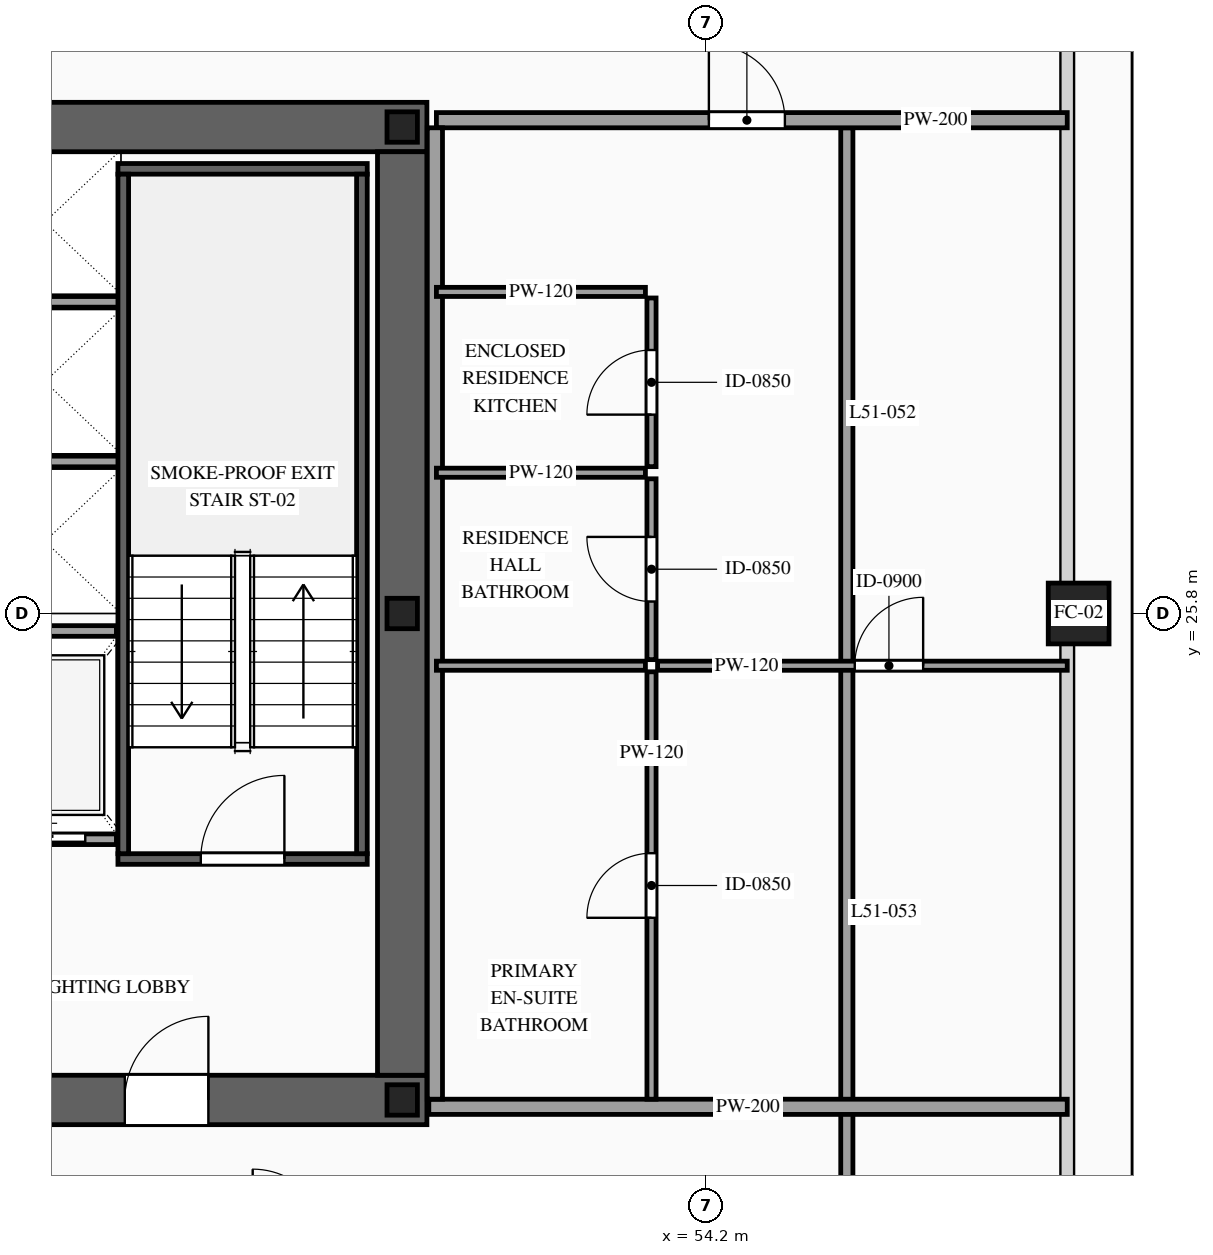
"""IFC4 building model, lengths in metres.
Left out: names, types, materials, properties, quantities, classifications, styles, units other than length and angle.
Written with IfcOpenShell. Run it as: python <this file> out.ifc"""

import sys

from ifc_helpers import new_model, si_unit, direction, frame, frame_2d, origin, origin_2d, place, context, subcontext, project, spatial, rectangle, hollow_rectangle, i_section, extrude, source, transform, mapped, element, fill, save


model = new_model("IFC4")
c1 = context("Model", 3, precision=1e-05, world=origin(), true_north=direction((0.0, 1.0)))
c2 = subcontext(c1, "Body", "Model", "MODEL_VIEW")
j1 = project(units=[si_unit("LENGTHUNIT", "METRE"), si_unit("PLANEANGLEUNIT", "RADIAN")], contexts=[c1])
p1 = place(None, origin())
s1 = spatial("IfcSite", under=j1, at=p1, CompositionType="ELEMENT")
p2 = place(p1, origin())
s2 = spatial("IfcBuilding", under=s1, at=p2, CompositionType="ELEMENT")
p3 = place(p2, frame((0.0, 0.0, 195.0)))
s3 = spatial("IfcBuildingStorey", under=s2, at=p3, CompositionType="ELEMENT", Elevation=195.0)
p4 = place(p3, frame((23.475, 19.4, 0.0), z_axis=(0.0, 0.0, 1.0), x_axis=(1.0, 0.0, 0.0)))
e1 = element("IfcWall", 1, at=p4, inside=s3, PredefinedType="SHEAR", context=c2, shape_type="SweptSolid", body=[
    extrude(rectangle(XDim=27.05, YDim=0.65, at=frame_2d((13.525, 0.0))), origin(), (0.0, 0.0, 1.0), 3.5),
])
p5 = place(p4, frame((1.975, 0.0, 0.0)))
e2 = element("IfcOpeningElement", 2, at=p5, cuts=e1, PredefinedType="OPENING", context=c2, shape_type="SweptSolid", body=[
    extrude(rectangle(XDim=1.1, YDim=2.2, at=frame_2d((0.55, 1.1))), frame((0.0, 0.34, 0.0), z_axis=(0.0, -1.0, 0.0), x_axis=(1.0, 0.0, 0.0)), (0.0, 0.0, 1.0), 0.68),
])
p6 = place(p4, frame((9.875, 0.0, 0.0)))
e3 = element("IfcOpeningElement", 3, at=p6, cuts=e1, PredefinedType="OPENING", context=c2, shape_type="SweptSolid", body=[
    extrude(rectangle(XDim=1.1, YDim=2.2, at=frame_2d((0.55, 1.1))), frame((0.0, 0.34, 0.0), z_axis=(0.0, -1.0, 0.0), x_axis=(1.0, 0.0, 0.0)), (0.0, 0.0, 1.0), 0.68),
])
p7 = place(p4, frame((23.075, 0.0, 0.0)))
e4 = element("IfcOpeningElement", 4, at=p7, cuts=e1, PredefinedType="OPENING", context=c2, shape_type="SweptSolid", body=[
    extrude(rectangle(XDim=1.1, YDim=2.2, at=frame_2d((0.55, 1.1))), frame((0.0, 0.34, 0.0), z_axis=(0.0, -1.0, 0.0), x_axis=(1.0, 0.0, 0.0)), (0.0, 0.0, 1.0), 0.68),
])
p8 = place(p4, frame((19.695, 0.0, 0.0)))
e5 = element("IfcOpeningElement", 5, at=p8, cuts=e1, PredefinedType="OPENING", context=c2, shape_type="SweptSolid", body=[
    extrude(rectangle(XDim=0.9, YDim=2.15, at=frame_2d((0.45, 1.075))), frame((0.0, 0.34, 0.0), z_axis=(0.0, -1.0, 0.0), x_axis=(1.0, 0.0, 0.0)), (0.0, 0.0, 1.0), 0.68),
])
p9 = place(p4, frame((18.255, 0.0, 0.0)))
e6 = element("IfcOpeningElement", 6, at=p9, cuts=e1, PredefinedType="OPENING", context=c2, shape_type="SweptSolid", body=[
    extrude(rectangle(XDim=0.9, YDim=2.15, at=frame_2d((0.45, 1.075))), frame((0.0, 0.34, 0.0), z_axis=(0.0, -1.0, 0.0), x_axis=(1.0, 0.0, 0.0)), (0.0, 0.0, 1.0), 0.68),
])
p10 = place(p3, frame((23.475, 32.2, 0.0), z_axis=(0.0, 0.0, 1.0), x_axis=(1.0, 0.0, 0.0)))
e7 = element("IfcWall", 7, at=p10, inside=s3, PredefinedType="SHEAR", context=c2, shape_type="SweptSolid", body=[
    extrude(rectangle(XDim=27.05, YDim=0.65, at=frame_2d((13.525, 0.0))), origin(), (0.0, 0.0, 1.0), 3.5),
])
p11 = place(p10, frame((4.595, 0.0, 0.0)))
e8 = element("IfcOpeningElement", 8, at=p11, cuts=e7, PredefinedType="OPENING", context=c2, shape_type="SweptSolid", body=[
    extrude(rectangle(XDim=0.9, YDim=2.15, at=frame_2d((0.45, 1.075))), frame((0.0, 0.34, 0.0), z_axis=(0.0, -1.0, 0.0), x_axis=(1.0, 0.0, 0.0)), (0.0, 0.0, 1.0), 0.68),
])
p12 = place(p10, frame((9.875, 0.0, 0.0)))
e9 = element("IfcOpeningElement", 9, at=p12, cuts=e7, PredefinedType="OPENING", context=c2, shape_type="SweptSolid", body=[
    extrude(rectangle(XDim=1.1, YDim=2.2, at=frame_2d((0.55, 1.1))), frame((0.0, 0.34, 0.0), z_axis=(0.0, -1.0, 0.0), x_axis=(1.0, 0.0, 0.0)), (0.0, 0.0, 1.0), 0.68),
])
p13 = place(p10, frame((15.725, 0.0, 0.0)))
e10 = element("IfcOpeningElement", 10, at=p13, cuts=e7, PredefinedType="OPENING", context=c2, shape_type="SweptSolid", body=[
    extrude(rectangle(XDim=1.1, YDim=2.2, at=frame_2d((0.55, 1.1))), frame((0.0, 0.34, 0.0), z_axis=(0.0, -1.0, 0.0), x_axis=(1.0, 0.0, 0.0)), (0.0, 0.0, 1.0), 0.68),
])
p14 = place(p10, frame((18.255, 0.0, 0.0)))
e11 = element("IfcOpeningElement", 11, at=p14, cuts=e7, PredefinedType="OPENING", context=c2, shape_type="SweptSolid", body=[
    extrude(rectangle(XDim=0.9, YDim=2.15, at=frame_2d((0.45, 1.075))), frame((0.0, 0.34, 0.0), z_axis=(0.0, -1.0, 0.0), x_axis=(1.0, 0.0, 0.0)), (0.0, 0.0, 1.0), 0.68),
])
p15 = place(p10, frame((19.695, 0.0, 0.0)))
e12 = element("IfcOpeningElement", 12, at=p15, cuts=e7, PredefinedType="OPENING", context=c2, shape_type="SweptSolid", body=[
    extrude(rectangle(XDim=0.9, YDim=2.15, at=frame_2d((0.45, 1.075))), frame((0.0, 0.34, 0.0), z_axis=(0.0, -1.0, 0.0), x_axis=(1.0, 0.0, 0.0)), (0.0, 0.0, 1.0), 0.68),
])
m1 = source(origin(), c2, "Body", "SweptSolid", [
    extrude(rectangle(XDim=12.15, YDim=0.65, at=frame_2d((6.075, 0.0))), origin(), (0.0, 0.0, 1.0), 3.5),
])
p16 = place(p3, frame((50.2, 19.725, 0.0), z_axis=(0.0, 0.0, 1.0), x_axis=(0.0, 1.0, 0.0)))
e13 = element("IfcWall", 13, at=p16, inside=s3, PredefinedType="SHEAR", context=c2, shape_type="MappedRepresentation", body=[
    mapped(m1, transform((0.0, 0.0, 0.0), scale=1.0)),
])
m2 = source(origin(), c2, "Body", "SweptSolid", [
    extrude(i_section(OverallWidth=0.4, OverallDepth=0.4, WebThickness=0.013, FlangeThickness=0.021, at=origin_2d()), origin(), (0.0, 0.0, 1.0), 3.5),
])
for number, where, z_axis, x_axis in (
    (14, (50.2, 19.4, 0.0), (0.0, 0.0, 1.0), (1.0, 0.0, 0.0)),
    (15, (50.2, 25.8, 0.0), (0.0, 0.0, 1.0), (1.0, 0.0, 0.0)),
    (16, (50.2, 32.2, 0.0), (0.0, 0.0, 1.0), (1.0, 0.0, 0.0)),
):
    element("IfcColumn", number, at=place(p3, frame(where, z_axis=z_axis, x_axis=x_axis)), inside=s3, PredefinedType="COLUMN", context=c2, shape_type="MappedRepresentation", body=[
        mapped(m2, transform((0.0, 0.0, 0.0), scale=1.0)),
    ])
m3 = source(origin(), c2, "Body", "SweptSolid", [
    extrude(hollow_rectangle(XDim=0.8, YDim=0.8, WallThickness=0.036, at=origin_2d()), origin(), (0.0, 0.0, 1.0), 3.5),
])
p17 = place(p3, frame((59.1, 25.8, 0.0), z_axis=(0.0, 0.0, 1.0), x_axis=(1.0, 0.0, 0.0)))
e17 = element("IfcColumn", 17, at=p17, inside=s3, PredefinedType="COLUMN", context=c2, shape_type="MappedRepresentation", body=[
    mapped(m3, transform((0.0, 0.0, 0.0), scale=1.0)),
])
p18 = place(p3, frame((44.52, 22.83, 0.0), z_axis=(0.0, 0.0, 1.0), x_axis=(1.0, 0.0, 0.0)))
e18 = element("IfcWall", 18, at=p18, inside=s3, PredefinedType="SOLIDWALL", context=c2, shape_type="SweptSolid", body=[
    extrude(rectangle(XDim=1.92, YDim=0.14, at=frame_2d((0.96, 0.0))), origin(), (0.0, 0.0, 1.0), 3.28),
])
p19 = place(p18, frame((0.41, 0.0, 0.0)))
e19 = element("IfcOpeningElement", 19, at=p19, cuts=e18, PredefinedType="OPENING", context=c2, shape_type="SweptSolid", body=[
    extrude(rectangle(XDim=1.1, YDim=2.2, at=frame_2d((0.55, 1.1))), frame((0.0, 0.085, 0.0), z_axis=(0.0, -1.0, 0.0), x_axis=(1.0, 0.0, 0.0)), (0.0, 0.0, 1.0), 0.17),
])
m4 = source(origin(), c2, "Body", "SweptSolid", [
    extrude(rectangle(XDim=1.92, YDim=0.14, at=frame_2d((0.96, 0.0))), origin(), (0.0, 0.0, 1.0), 3.28),
])
p20 = place(p3, frame((44.52, 25.57, 0.0), z_axis=(0.0, 0.0, 1.0), x_axis=(1.0, 0.0, 0.0)))
e20 = element("IfcWall", 20, at=p20, inside=s3, PredefinedType="SOLIDWALL", context=c2, shape_type="MappedRepresentation", body=[
    mapped(m4, transform((0.0, 0.0, 0.0), scale=1.0)),
])
m5 = source(origin(), c2, "Body", "SweptSolid", [
    extrude(rectangle(XDim=2.0, YDim=0.14, at=frame_2d((1.0, 0.0))), origin(), (0.0, 0.0, 1.0), 3.28),
])
for number, where, z_axis, x_axis in (
    (21, (44.5, 27.8, 0.0), (0.0, 0.0, 1.0), (1.0, 0.0, 0.0)),
    (22, (44.5, 29.9, 0.0), (0.0, 0.0, 1.0), (1.0, 0.0, 0.0)),
):
    element("IfcWall", number, at=place(p3, frame(where, z_axis=z_axis, x_axis=x_axis)), inside=s3, PredefinedType="SOLIDWALL", context=c2, shape_type="MappedRepresentation", body=[
        mapped(m5, transform((0.0, 0.0, 0.0), scale=1.0)),
    ])
p21 = place(p3, frame((46.46, 22.57, 0.0), z_axis=(0.0, 0.0, 1.0), x_axis=(1.0, 0.0, 0.0)))
e23 = element("IfcWall", 23, at=p21, inside=s3, PredefinedType="SOLIDWALL", context=c2, shape_type="SweptSolid", body=[
    extrude(rectangle(XDim=3.28, YDim=0.14, at=frame_2d((1.64, 0.0))), origin(), (0.0, 0.0, 1.0), 3.28),
])
p22 = place(p21, frame((1.09, 0.0, 0.0)))
e24 = element("IfcOpeningElement", 24, at=p22, cuts=e23, PredefinedType="OPENING", context=c2, shape_type="SweptSolid", body=[
    extrude(rectangle(XDim=1.1, YDim=2.2, at=frame_2d((0.55, 1.1))), frame((0.0, 0.085, 0.0), z_axis=(0.0, -1.0, 0.0), x_axis=(1.0, 0.0, 0.0)), (0.0, 0.0, 1.0), 0.17),
])
m6 = source(origin(), c2, "Body", "SweptSolid", [
    extrude(rectangle(XDim=3.28, YDim=0.14, at=frame_2d((1.64, 0.0))), origin(), (0.0, 0.0, 1.0), 3.28),
])
p23 = place(p3, frame((46.46, 31.65, 0.0), z_axis=(0.0, 0.0, 1.0), x_axis=(1.0, 0.0, 0.0)))
e25 = element("IfcWall", 25, at=p23, inside=s3, PredefinedType="SOLIDWALL", context=c2, shape_type="MappedRepresentation", body=[
    mapped(m6, transform((0.0, 0.0, 0.0), scale=1.0)),
])
m7 = source(origin(), c2, "Body", "SweptSolid", [
    extrude(rectangle(XDim=8.94, YDim=0.14, at=frame_2d((4.47, 0.0))), origin(), (0.0, 0.0, 1.0), 3.28),
])
for number, where, z_axis, x_axis in (
    (26, (46.53, 22.64, 0.0), (0.0, 0.0, 1.0), (0.0, 1.0, 0.0)),
    (27, (49.67, 22.64, 0.0), (0.0, 0.0, 1.0), (0.0, 1.0, 0.0)),
):
    element("IfcWall", number, at=place(p3, frame(where, z_axis=z_axis, x_axis=x_axis)), inside=s3, PredefinedType="SOLIDWALL", context=c2, shape_type="MappedRepresentation", body=[
        mapped(m7, transform((0.0, 0.0, 0.0), scale=1.0)),
    ])
m8 = source(origin(), c2, "Body", "SweptSolid", [
    extrude(rectangle(XDim=28.19, YDim=0.16, at=frame_2d((14.095, 0.0))), origin(), (0.0, 0.0, 1.0), 3.28),
])
p24 = place(p3, frame((56.05, 4.0, 0.0), z_axis=(0.0, 0.0, 1.0), x_axis=(0.0, 1.0, 0.0)))
e28 = element("IfcWall", 28, at=p24, inside=s3, PredefinedType="PARTITIONING", context=c2, shape_type="MappedRepresentation", body=[
    mapped(m8, transform((0.0, 0.0, 0.0), scale=1.0)),
])
p25 = place(p3, frame((50.65, 32.29, 0.0), z_axis=(0.0, 0.0, 1.0), x_axis=(1.0, 0.0, 0.0)))
e29 = element("IfcWall", 29, at=p25, inside=s3, PredefinedType="PARTITIONING", context=c2, shape_type="SweptSolid", body=[
    extrude(rectangle(XDim=8.3, YDim=0.2, at=frame_2d((4.15, 0.0))), origin(), (0.0, 0.0, 1.0), 2.775),
])
p26 = place(p25, frame((3.585, 0.0, 0.0)))
e30 = element("IfcOpeningElement", 30, at=p26, cuts=e29, PredefinedType="OPENING", context=c2, shape_type="SweptSolid", body=[
    extrude(rectangle(XDim=1.0, YDim=2.2, at=frame_2d((0.5, 1.1))), frame((0.0, 0.115, 0.0), z_axis=(0.0, -1.0, 0.0), x_axis=(1.0, 0.0, 0.0)), (0.0, 0.0, 1.0), 0.23),
])
m9 = source(origin(), c2, "Body", "SweptSolid", [
    extrude(rectangle(XDim=8.4, YDim=0.2, at=frame_2d((4.2, 0.0))), origin(), (0.0, 0.0, 1.0), 2.775),
])
p27 = place(p3, frame((50.55, 19.31, 0.0), z_axis=(0.0, 0.0, 1.0), x_axis=(1.0, 0.0, 0.0)))
e31 = element("IfcWall", 31, at=p27, inside=s3, PredefinedType="PARTITIONING", context=c2, shape_type="MappedRepresentation", body=[
    mapped(m9, transform((0.0, 0.0, 0.0), scale=1.0)),
])
m10 = source(origin(), c2, "Body", "SweptSolid", [
    extrude(rectangle(XDim=12.78, YDim=0.2, at=frame_2d((6.39, 0.0))), origin(), (0.0, 0.0, 1.0), 3.28),
])
p28 = place(p3, frame((50.63, 19.41, 0.0), z_axis=(0.0, 0.0, 1.0), x_axis=(0.0, 1.0, 0.0)))
e32 = element("IfcWall", 32, at=p28, inside=s3, PredefinedType="PARTITIONING", context=c2, shape_type="MappedRepresentation", body=[
    mapped(m10, transform((0.0, 0.0, 0.0), scale=1.0)),
])
m11 = source(origin(), c2, "Body", "SweptSolid", [
    extrude(rectangle(XDim=2.75, YDim=0.12, at=frame_2d((1.375, 0.0))), origin(), (0.0, 0.0, 1.0), 3.28),
])
for number, where, z_axis, x_axis in (
    (33, (50.65, 25.113, 0.0), (0.0, 0.0, 1.0), (1.0, 0.0, 0.0)),
    (34, (50.65, 27.652, 0.0), (0.0, 0.0, 1.0), (1.0, 0.0, 0.0)),
):
    element("IfcWall", number, at=place(p3, frame(where, z_axis=z_axis, x_axis=x_axis)), inside=s3, PredefinedType="PARTITIONING", context=c2, shape_type="MappedRepresentation", body=[
        mapped(m11, transform((0.0, 0.0, 0.0), scale=1.0)),
    ])
p29 = place(p3, frame((53.48, 25.193, 0.0), z_axis=(0.0, 0.0, 1.0), x_axis=(0.0, 1.0, 0.0)))
e35 = element("IfcWall", 35, at=p29, inside=s3, PredefinedType="PARTITIONING", context=c2, shape_type="SweptSolid", body=[
    extrude(rectangle(XDim=2.379, YDim=0.12, at=frame_2d((1.189, 0.0))), origin(), (0.0, 0.0, 1.0), 3.28),
])
p30 = place(p29, frame((0.764, 0.0, 0.0)))
e36 = element("IfcOpeningElement", 36, at=p30, cuts=e35, PredefinedType="OPENING", context=c2, shape_type="SweptSolid", body=[
    extrude(rectangle(XDim=0.85, YDim=2.1, at=frame_2d((0.425, 1.05))), frame((0.0, 0.075, 0.0), z_axis=(0.0, -1.0, 0.0), x_axis=(1.0, 0.0, 0.0)), (0.0, 0.0, 1.0), 0.15),
])
p31 = place(p3, frame((50.65, 30.031, 0.0), z_axis=(0.0, 0.0, 1.0), x_axis=(1.0, 0.0, 0.0)))
e37 = element("IfcWall", 37, at=p31, inside=s3, PredefinedType="PARTITIONING", context=c2, shape_type="MappedRepresentation", body=[
    mapped(m11, transform((0.0, 0.0, 0.0), scale=1.0)),
])
p32 = place(p3, frame((53.48, 27.732, 0.0), z_axis=(0.0, 0.0, 1.0), x_axis=(0.0, 1.0, 0.0)))
e38 = element("IfcWall", 38, at=p32, inside=s3, PredefinedType="PARTITIONING", context=c2, shape_type="SweptSolid", body=[
    extrude(rectangle(XDim=2.219, YDim=0.12, at=frame_2d((1.109, 0.0))), origin(), (0.0, 0.0, 1.0), 3.28),
])
p33 = place(p32, frame((0.685, 0.0, 0.0)))
e39 = element("IfcOpeningElement", 39, at=p33, cuts=e38, PredefinedType="OPENING", context=c2, shape_type="SweptSolid", body=[
    extrude(rectangle(XDim=0.85, YDim=2.1, at=frame_2d((0.425, 1.05))), frame((0.0, 0.075, 0.0), z_axis=(0.0, -1.0, 0.0), x_axis=(1.0, 0.0, 0.0)), (0.0, 0.0, 1.0), 0.15),
])
p34 = place(p3, frame((53.56, 25.113, 0.0), z_axis=(0.0, 0.0, 1.0), x_axis=(1.0, 0.0, 0.0)))
e40 = element("IfcWall", 40, at=p34, inside=s3, PredefinedType="PARTITIONING", context=c2, shape_type="SweptSolid", body=[
    extrude(rectangle(XDim=5.39, YDim=0.12, at=frame_2d((2.695, 0.0))), origin(), (0.0, 0.0, 1.0), 3.28),
])
p35 = place(p34, frame((2.594, 0.0, 0.0)))
e41 = element("IfcOpeningElement", 41, at=p35, cuts=e40, PredefinedType="OPENING", context=c2, shape_type="SweptSolid", body=[
    extrude(rectangle(XDim=0.9, YDim=2.15, at=frame_2d((0.45, 1.075))), frame((0.0, 0.075, 0.0), z_axis=(0.0, -1.0, 0.0), x_axis=(1.0, 0.0, 0.0)), (0.0, 0.0, 1.0), 0.15),
])
p36 = place(p3, frame((53.48, 19.41, 0.0), z_axis=(0.0, 0.0, 1.0), x_axis=(0.0, 1.0, 0.0)))
e42 = element("IfcWall", 42, at=p36, inside=s3, PredefinedType="PARTITIONING", context=c2, shape_type="SweptSolid", body=[
    extrude(rectangle(XDim=5.623, YDim=0.12, at=frame_2d((2.812, 0.0))), origin(), (0.0, 0.0, 1.0), 3.28),
])
p37 = place(p36, frame((2.386, 0.0, 0.0)))
e43 = element("IfcOpeningElement", 43, at=p37, cuts=e42, PredefinedType="OPENING", context=c2, shape_type="SweptSolid", body=[
    extrude(rectangle(XDim=0.85, YDim=2.1, at=frame_2d((0.425, 1.05))), frame((0.0, 0.075, 0.0), z_axis=(0.0, -1.0, 0.0), x_axis=(1.0, 0.0, 0.0)), (0.0, 0.0, 1.0), 0.15),
])
m12 = source(origin(), c2, "Body", "SweptSolid", [
    extrude(rectangle(XDim=1.1, YDim=2.2, at=frame_2d((0.55, 1.1))), frame((0.0, 0.025, 0.0), z_axis=(0.0, -1.0, 0.0), x_axis=(1.0, 0.0, 0.0)), (0.0, 0.0, 1.0), 0.05),
])
p38 = place(p19, origin())
e44 = element("IfcDoor", 44, at=p38, inside=s3, OperationType="SLIDING_TO_RIGHT", PredefinedType="DOOR", context=c2, shape_type="MappedRepresentation", body=[
    mapped(m12, transform((0.0, 0.0, 0.0), scale=1.0)),
])
fill(e19, e44)
m13 = source(origin(), c2, "Body", "SweptSolid", [
    extrude(rectangle(XDim=1.1, YDim=2.2, at=frame_2d((0.55, 1.1))), frame((0.0, 0.025, 0.0), z_axis=(0.0, -1.0, 0.0), x_axis=(1.0, 0.0, 0.0)), (0.0, 0.0, 1.0), 0.05),
])
p39 = place(p22, origin())
e45 = element("IfcDoor", 45, at=p39, inside=s3, OperationType="SINGLE_SWING_RIGHT", PredefinedType="DOOR", context=c2, shape_type="MappedRepresentation", body=[
    mapped(m13, transform((0.0, 0.0, 0.0), scale=1.0)),
])
fill(e24, e45)
p40 = place(p7, origin())
e46 = element("IfcDoor", 46, at=p40, inside=s3, OperationType="SINGLE_SWING_RIGHT", PredefinedType="DOOR", context=c2, shape_type="MappedRepresentation", body=[
    mapped(m13, transform((0.0, 0.0, 0.0), scale=1.0)),
])
fill(e4, e46)
m14 = source(origin(), c2, "Body", "SweptSolid", [
    extrude(rectangle(XDim=1.0, YDim=2.2, at=frame_2d((0.5, 1.1))), frame((0.0, 0.025, 0.0), z_axis=(0.0, -1.0, 0.0), x_axis=(1.0, 0.0, 0.0)), (0.0, 0.0, 1.0), 0.05),
])
p41 = place(p26, origin())
e47 = element("IfcDoor", 47, at=p41, inside=s3, OperationType="SINGLE_SWING_LEFT", PredefinedType="DOOR", context=c2, shape_type="MappedRepresentation", body=[
    mapped(m14, transform((0.0, 0.0, 0.0), scale=1.0)),
])
fill(e30, e47)
m15 = source(origin(), c2, "Body", "SweptSolid", [
    extrude(rectangle(XDim=0.85, YDim=2.1, at=frame_2d((0.425, 1.05))), frame((0.0, 0.025, 0.0), z_axis=(0.0, -1.0, 0.0), x_axis=(1.0, 0.0, 0.0)), (0.0, 0.0, 1.0), 0.05),
])
p42 = place(p30, origin())
e48 = element("IfcDoor", 48, at=p42, inside=s3, OperationType="SINGLE_SWING_RIGHT", PredefinedType="DOOR", context=c2, shape_type="MappedRepresentation", body=[
    mapped(m15, transform((0.0, 0.0, 0.0), scale=1.0)),
])
fill(e36, e48)
p43 = place(p33, origin())
e49 = element("IfcDoor", 49, at=p43, inside=s3, OperationType="SINGLE_SWING_LEFT", PredefinedType="DOOR", context=c2, shape_type="MappedRepresentation", body=[
    mapped(m15, transform((0.0, 0.0, 0.0), scale=1.0)),
])
fill(e39, e49)
m16 = source(origin(), c2, "Body", "SweptSolid", [
    extrude(rectangle(XDim=0.9, YDim=2.15, at=frame_2d((0.45, 1.075))), frame((0.0, 0.025, 0.0), z_axis=(0.0, -1.0, 0.0), x_axis=(1.0, 0.0, 0.0)), (0.0, 0.0, 1.0), 0.05),
])
p44 = place(p35, origin())
e50 = element("IfcDoor", 50, at=p44, inside=s3, OperationType="SINGLE_SWING_RIGHT", PredefinedType="DOOR", context=c2, shape_type="MappedRepresentation", body=[
    mapped(m16, transform((0.0, 0.0, 0.0), scale=1.0)),
])
fill(e41, e50)
p45 = place(p37, origin())
e51 = element("IfcDoor", 51, at=p45, inside=s3, OperationType="SINGLE_SWING_LEFT", PredefinedType="DOOR", context=c2, shape_type="MappedRepresentation", body=[
    mapped(m15, transform((0.0, 0.0, 0.0), scale=1.0)),
])
fill(e43, e51)
save(model, sys.argv[1])
